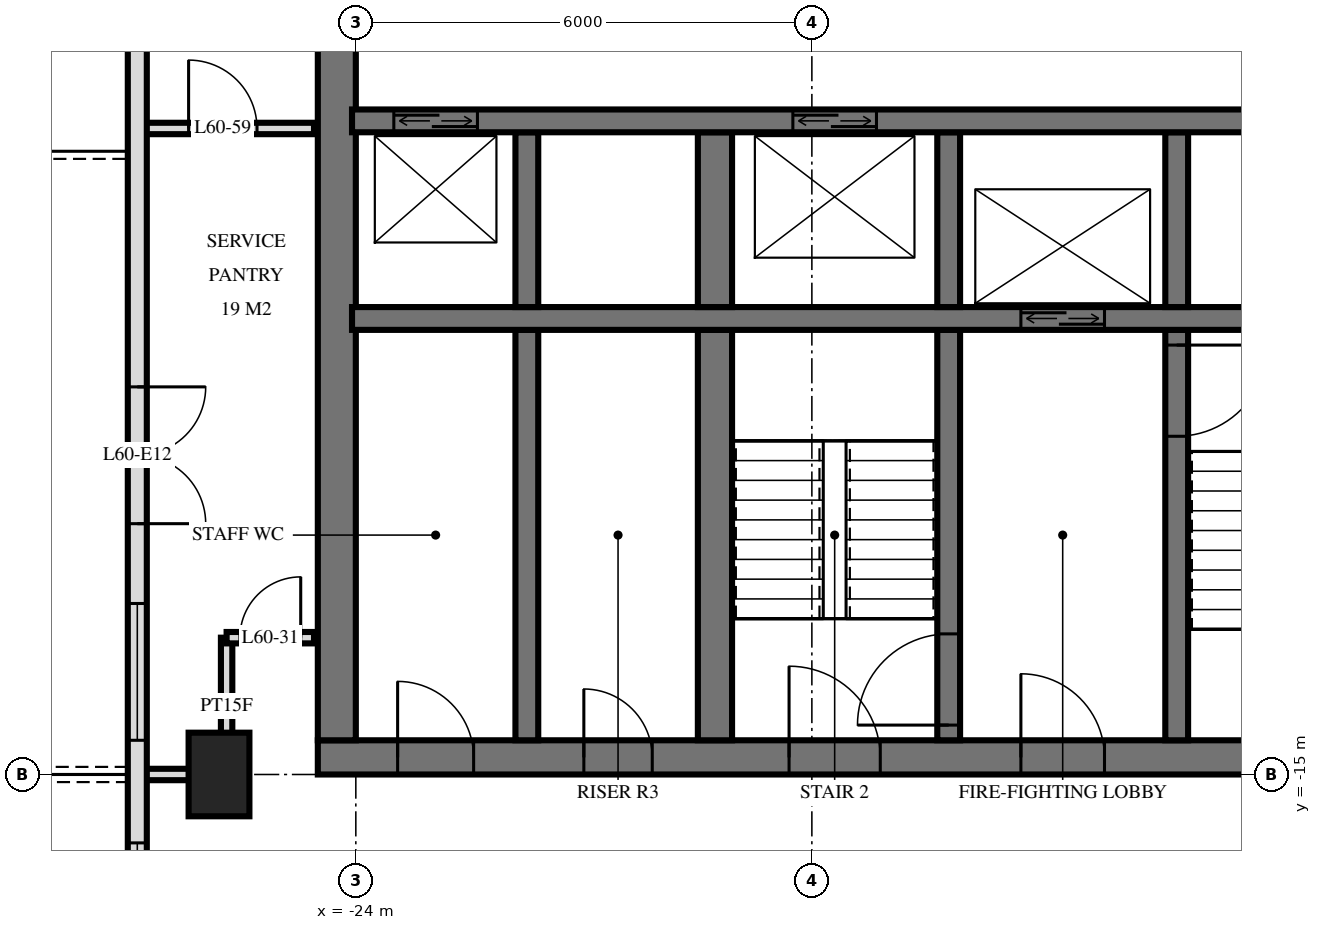
"""IFC4 building model, lengths in metres.
Left out: names, types, materials, properties, quantities, classifications, styles, units other than length and angle.
Written with IfcOpenShell. Run it as: python <this file> out.ifc"""

import sys

from ifc_helpers import new_model, si_unit, direction, frame, frame_2d, origin, origin_2d, place, context, subcontext, project, spatial, rectangle, extrude, element, fill, save


model = new_model("IFC4")
c1 = context("Model", 3, precision=1e-05, world=origin(), true_north=direction((0.0, 1.0)))
c2 = subcontext(c1, "Body", "Model", "MODEL_VIEW")
j1 = project(units=[si_unit("LENGTHUNIT", "METRE"), si_unit("PLANEANGLEUNIT", "RADIAN")], contexts=[c1])
p1 = place(None, origin())
s1 = spatial("IfcSite", under=j1, at=p1, CompositionType="ELEMENT")
p2 = place(p1, origin())
s2 = spatial("IfcBuilding", under=s1, at=p2, CompositionType="ELEMENT")
p3 = place(p2, frame((0.0, 0.0, 229.1)))
s3 = spatial("IfcBuildingStorey", under=s2, at=p3, CompositionType="ELEMENT", Elevation=229.1)
p4 = place(p3, frame((-25.8, -15.0, 0.0), z_axis=(0.0, 0.0, 1.0), x_axis=(0.0, 1.0, 0.0)))
e1 = element("IfcColumn", 1, at=p4, inside=s3, PredefinedType="COLUMN", context=c2, shape_type="SweptSolid", body=[
    extrude(rectangle(XDim=1.1, YDim=0.8, at=origin_2d()), origin(), (0.0, 0.0, 1.0), 3.5),
])
p5 = place(p3, frame((-24.5, -14.775, 0.0), z_axis=(0.0, 0.0, 1.0), x_axis=(1.0, 0.0, 0.0)))
e2 = element("IfcWall", 2, at=p5, inside=s3, PredefinedType="SHEAR", context=c2, shape_type="SweptSolid", body=[
    extrude(rectangle(XDim=14.5, YDim=0.45, at=frame_2d((7.25, 0.0))), origin(), (0.0, 0.0, 1.0), 3.5),
])
p6 = place(p5, frame((6.2, 0.0, 0.0)))
e3 = element("IfcOpeningElement", 3, at=p6, cuts=e2, PredefinedType="OPENING", context=c2, shape_type="SweptSolid", body=[
    extrude(rectangle(XDim=1.2, YDim=2.1, at=frame_2d((0.6, 1.05))), frame((0.0, 0.235, 0.0), z_axis=(0.0, -1.0, 0.0), x_axis=(1.0, 0.0, 0.0)), (0.0, 0.0, 1.0), 0.47),
])
p7 = place(p5, frame((9.25, 0.0, 0.0)))
e4 = element("IfcOpeningElement", 4, at=p7, cuts=e2, PredefinedType="OPENING", context=c2, shape_type="SweptSolid", body=[
    extrude(rectangle(XDim=1.1, YDim=2.1, at=frame_2d((0.55, 1.05))), frame((0.0, 0.235, 0.0), z_axis=(0.0, -1.0, 0.0), x_axis=(1.0, 0.0, 0.0)), (0.0, 0.0, 1.0), 0.47),
])
p8 = place(p5, frame((3.5, 0.0, 0.0)))
e5 = element("IfcOpeningElement", 5, at=p8, cuts=e2, PredefinedType="OPENING", context=c2, shape_type="SweptSolid", body=[
    extrude(rectangle(XDim=0.9, YDim=2.1, at=frame_2d((0.45, 1.05))), frame((0.0, 0.235, 0.0), z_axis=(0.0, -1.0, 0.0), x_axis=(1.0, 0.0, 0.0)), (0.0, 0.0, 1.0), 0.47),
])
p9 = place(p5, frame((1.05, 0.0, 0.0)))
e6 = element("IfcOpeningElement", 6, at=p9, cuts=e2, PredefinedType="OPENING", context=c2, shape_type="SweptSolid", body=[
    extrude(rectangle(XDim=1.0, YDim=2.1, at=frame_2d((0.5, 1.05))), frame((0.0, 0.235, 0.0), z_axis=(0.0, -1.0, 0.0), x_axis=(1.0, 0.0, 0.0)), (0.0, 0.0, 1.0), 0.47),
])
p10 = place(p3, frame((-24.25, -14.55, 0.0), z_axis=(0.0, 0.0, 1.0), x_axis=(0.0, 1.0, 0.0)))
e7 = element("IfcWall", 7, at=p10, inside=s3, PredefinedType="SHEAR", context=c2, shape_type="SweptSolid", body=[
    extrude(rectangle(XDim=14.1, YDim=0.5, at=frame_2d((7.05, 0.0))), origin(), (0.0, 0.0, 1.0), 3.5),
])
p11 = place(p3, frame((-24.05, -6.4, 0.0), z_axis=(0.0, 0.0, 1.0), x_axis=(1.0, 0.0, 0.0)))
e8 = element("IfcWall", 8, at=p11, inside=s3, PredefinedType="SHEAR", context=c2, shape_type="SweptSolid", body=[
    extrude(rectangle(XDim=13.7, YDim=0.3, at=frame_2d((6.85, 0.0))), origin(), (0.0, 0.0, 1.0), 3.5),
])
p12 = place(p11, frame((0.55, 0.0, 0.0)))
e9 = element("IfcOpeningElement", 9, at=p12, cuts=e8, PredefinedType="OPENING", context=c2, shape_type="SweptSolid", body=[
    extrude(rectangle(XDim=1.1, YDim=2.1, at=frame_2d((0.55, 1.05))), frame((0.0, 0.16, 0.0), z_axis=(0.0, -1.0, 0.0), x_axis=(1.0, 0.0, 0.0)), (0.0, 0.0, 1.0), 0.32),
])
p13 = place(p11, frame((5.8, 0.0, 0.0)))
e10 = element("IfcOpeningElement", 10, at=p13, cuts=e8, PredefinedType="OPENING", context=c2, shape_type="SweptSolid", body=[
    extrude(rectangle(XDim=1.1, YDim=2.1, at=frame_2d((0.55, 1.05))), frame((0.0, 0.16, 0.0), z_axis=(0.0, -1.0, 0.0), x_axis=(1.0, 0.0, 0.0)), (0.0, 0.0, 1.0), 0.32),
])
p14 = place(p3, frame((-24.05, -9.0, 0.0), z_axis=(0.0, 0.0, 1.0), x_axis=(1.0, 0.0, 0.0)))
e11 = element("IfcWall", 11, at=p14, inside=s3, PredefinedType="SHEAR", context=c2, shape_type="SweptSolid", body=[
    extrude(rectangle(XDim=13.7, YDim=0.3, at=frame_2d((6.85, 0.0))), origin(), (0.0, 0.0, 1.0), 3.5),
])
p15 = place(p14, frame((8.8, 0.0, 0.0)))
e12 = element("IfcOpeningElement", 12, at=p15, cuts=e11, PredefinedType="OPENING", context=c2, shape_type="SweptSolid", body=[
    extrude(rectangle(XDim=1.1, YDim=2.1, at=frame_2d((0.55, 1.05))), frame((0.0, 0.16, 0.0), z_axis=(0.0, -1.0, 0.0), x_axis=(1.0, 0.0, 0.0)), (0.0, 0.0, 1.0), 0.32),
])
p16 = place(p3, frame((-13.2, -8.85, 0.0), z_axis=(0.0, 0.0, 1.0), x_axis=(0.0, 1.0, 0.0)))
e13 = element("IfcWall", 13, at=p16, inside=s3, PredefinedType="SHEAR", context=c2, shape_type="SweptSolid", body=[
    extrude(rectangle(XDim=2.3, YDim=0.3, at=frame_2d((1.15, 0.0))), origin(), (0.0, 0.0, 1.0), 3.5),
])
p17 = place(p3, frame((-13.2, -14.55, 0.0), z_axis=(0.0, 0.0, 1.0), x_axis=(0.0, 1.0, 0.0)))
e14 = element("IfcWall", 14, at=p17, inside=s3, PredefinedType="SHEAR", context=c2, shape_type="SweptSolid", body=[
    extrude(rectangle(XDim=5.4, YDim=0.3, at=frame_2d((2.7, 0.0))), origin(), (0.0, 0.0, 1.0), 3.5),
])
p18 = place(p17, frame((4.0, 0.0, 0.0)))
e15 = element("IfcOpeningElement", 15, at=p18, cuts=e14, PredefinedType="OPENING", context=c2, shape_type="SweptSolid", body=[
    extrude(rectangle(XDim=1.2, YDim=2.1, at=frame_2d((0.6, 1.05))), frame((0.0, 0.16, 0.0), z_axis=(0.0, -1.0, 0.0), x_axis=(1.0, 0.0, 0.0)), (0.0, 0.0, 1.0), 0.32),
])
p19 = place(p3, frame((-16.2, -8.85, 0.0), z_axis=(0.0, 0.0, 1.0), x_axis=(0.0, 1.0, 0.0)))
e16 = element("IfcWall", 16, at=p19, inside=s3, PredefinedType="SHEAR", context=c2, shape_type="SweptSolid", body=[
    extrude(rectangle(XDim=2.3, YDim=0.3, at=frame_2d((1.15, 0.0))), origin(), (0.0, 0.0, 1.0), 3.5),
])
p20 = place(p3, frame((-16.2, -14.55, 0.0), z_axis=(0.0, 0.0, 1.0), x_axis=(0.0, 1.0, 0.0)))
e17 = element("IfcWall", 17, at=p20, inside=s3, PredefinedType="SHEAR", context=c2, shape_type="SweptSolid", body=[
    extrude(rectangle(XDim=5.4, YDim=0.3, at=frame_2d((2.7, 0.0))), origin(), (0.0, 0.0, 1.0), 3.5),
])
p21 = place(p20, frame((0.2, 0.0, 0.0)))
e18 = element("IfcOpeningElement", 18, at=p21, cuts=e17, PredefinedType="OPENING", context=c2, shape_type="SweptSolid", body=[
    extrude(rectangle(XDim=1.2, YDim=2.1, at=frame_2d((0.6, 1.05))), frame((0.0, 0.16, 0.0), z_axis=(0.0, -1.0, 0.0), x_axis=(1.0, 0.0, 0.0)), (0.0, 0.0, 1.0), 0.32),
])
p22 = place(p3, frame((-19.275, -8.85, 0.0), z_axis=(0.0, 0.0, 1.0), x_axis=(0.0, 1.0, 0.0)))
e19 = element("IfcWall", 19, at=p22, inside=s3, PredefinedType="SHEAR", context=c2, shape_type="SweptSolid", body=[
    extrude(rectangle(XDim=2.3, YDim=0.45, at=frame_2d((1.15, 0.0))), origin(), (0.0, 0.0, 1.0), 3.5),
])
p23 = place(p3, frame((-19.275, -14.55, 0.0), z_axis=(0.0, 0.0, 1.0), x_axis=(0.0, 1.0, 0.0)))
e20 = element("IfcWall", 20, at=p23, inside=s3, PredefinedType="SHEAR", context=c2, shape_type="SweptSolid", body=[
    extrude(rectangle(XDim=5.4, YDim=0.45, at=frame_2d((2.7, 0.0))), origin(), (0.0, 0.0, 1.0), 3.5),
])
p24 = place(p3, frame((-21.75, -8.85, 0.0), z_axis=(0.0, 0.0, 1.0), x_axis=(0.0, 1.0, 0.0)))
e21 = element("IfcWall", 21, at=p24, inside=s3, PredefinedType="SHEAR", context=c2, shape_type="SweptSolid", body=[
    extrude(rectangle(XDim=2.3, YDim=0.3, at=frame_2d((1.15, 0.0))), origin(), (0.0, 0.0, 1.0), 3.5),
])
p25 = place(p3, frame((-21.75, -14.55, 0.0), z_axis=(0.0, 0.0, 1.0), x_axis=(0.0, 1.0, 0.0)))
e22 = element("IfcWall", 22, at=p25, inside=s3, PredefinedType="SHEAR", context=c2, shape_type="SweptSolid", body=[
    extrude(rectangle(XDim=5.4, YDim=0.3, at=frame_2d((2.7, 0.0))), origin(), (0.0, 0.0, 1.0), 3.5),
])
p26 = place(p3, frame((-26.875, -3.325, 0.0), z_axis=(0.0, 0.0, 1.0), x_axis=(0.0, -1.0, 0.0)))
e23 = element("IfcWall", 23, at=p26, inside=s3, PredefinedType="SOLIDWALL", context=c2, shape_type="SweptSolid", body=[
    extrude(rectangle(XDim=21.551, YDim=0.25, at=frame_2d((10.775, 0.0))), origin(), (0.0, 0.0, 1.0), 3.22),
])
p27 = place(p26, frame((6.575, 0.0, 0.0)))
e24 = element("IfcOpeningElement", 24, at=p27, cuts=e23, PredefinedType="OPENING", context=c2, shape_type="SweptSolid", body=[
    extrude(rectangle(XDim=1.8, YDim=2.4, at=frame_2d((0.9, 1.2))), frame((0.0, 0.135, 0.0), z_axis=(0.0, -1.0, 0.0), x_axis=(1.0, 0.0, 0.0)), (0.0, 0.0, 1.0), 0.27),
])
p28 = place(p26, frame((9.425, 0.0, 0.9)))
e25 = element("IfcOpeningElement", 25, at=p28, cuts=e23, PredefinedType="OPENING", context=c2, shape_type="SweptSolid", body=[
    extrude(rectangle(XDim=1.8, YDim=1.5, at=frame_2d((0.9, 0.75))), frame((0.0, 0.135, 0.0), z_axis=(0.0, -1.0, 0.0), x_axis=(1.0, 0.0, 0.0)), (0.0, 0.0, 1.0), 0.27),
])
p29 = place(p26, frame((12.575, 0.0, 0.9)))
e26 = element("IfcOpeningElement", 26, at=p29, cuts=e23, PredefinedType="OPENING", context=c2, shape_type="SweptSolid", body=[
    extrude(rectangle(XDim=1.2, YDim=1.5, at=frame_2d((0.6, 0.75))), frame((0.0, 0.135, 0.0), z_axis=(0.0, -1.0, 0.0), x_axis=(1.0, 0.0, 0.0)), (0.0, 0.0, 1.0), 0.27),
])
p30 = place(p26, frame((15.275, 0.0, 0.0)))
e27 = element("IfcOpeningElement", 27, at=p30, cuts=e23, PredefinedType="OPENING", context=c2, shape_type="SweptSolid", body=[
    extrude(rectangle(XDim=1.8, YDim=2.4, at=frame_2d((0.9, 1.2))), frame((0.0, 0.135, 0.0), z_axis=(0.0, -1.0, 0.0), x_axis=(1.0, 0.0, 0.0)), (0.0, 0.0, 1.0), 0.27),
])
p31 = place(p26, frame((18.875, 0.0, 0.0)))
e28 = element("IfcOpeningElement", 28, at=p31, cuts=e23, PredefinedType="OPENING", context=c2, shape_type="SweptSolid", body=[
    extrude(rectangle(XDim=1.8, YDim=2.4, at=frame_2d((0.9, 1.2))), frame((0.0, 0.135, 0.0), z_axis=(0.0, -1.0, 0.0), x_axis=(1.0, 0.0, 0.0)), (0.0, 0.0, 1.0), 0.27),
])
p32 = place(p3, frame((-25.7, -15.0, 0.0), z_axis=(0.0, 0.0, 1.0), x_axis=(0.0, 1.0, 0.0)))
e29 = element("IfcWall", 29, at=p32, inside=s3, PredefinedType="PARTITIONING", context=c2, shape_type="SweptSolid", body=[
    extrude(rectangle(XDim=1.8, YDim=0.15, at=frame_2d((0.9, 0.0))), origin(), (0.0, 0.0, 1.0), 3.22),
])
p33 = place(p3, frame((-26.82, -15.0, 0.0), z_axis=(0.0, 0.0, 1.0), x_axis=(1.0, 0.0, 0.0)))
e30 = element("IfcWall", 30, at=p33, inside=s3, PredefinedType="PARTITIONING", context=c2, shape_type="SweptSolid", body=[
    extrude(rectangle(XDim=1.12, YDim=0.15, at=frame_2d((0.56, 0.0))), origin(), (0.0, 0.0, 1.0), 3.22),
])
p34 = place(p3, frame((-25.7, -13.2, 0.0), z_axis=(0.0, 0.0, 1.0), x_axis=(1.0, 0.0, 0.0)))
e31 = element("IfcWall", 31, at=p34, inside=s3, PredefinedType="PARTITIONING", context=c2, shape_type="SweptSolid", body=[
    extrude(rectangle(XDim=1.15, YDim=0.15, at=frame_2d((0.575, 0.0))), origin(), (0.0, 0.0, 1.0), 3.22),
])
p35 = place(p34, frame((0.175, 0.0, 0.0)))
e32 = element("IfcOpeningElement", 32, at=p35, cuts=e31, PredefinedType="OPENING", context=c2, shape_type="SweptSolid", body=[
    extrude(rectangle(XDim=0.8, YDim=2.1, at=frame_2d((0.4, 1.05))), frame((0.0, 0.085, 0.0), z_axis=(0.0, -1.0, 0.0), x_axis=(1.0, 0.0, 0.0)), (0.0, 0.0, 1.0), 0.17),
])
p36 = place(p3, frame((-26.82, -6.5, 0.0), z_axis=(0.0, 0.0, 1.0), x_axis=(1.0, 0.0, 0.0)))
e33 = element("IfcWall", 33, at=p36, inside=s3, PredefinedType="PARTITIONING", context=c2, shape_type="SweptSolid", body=[
    extrude(rectangle(XDim=2.27, YDim=0.15, at=frame_2d((1.135, 0.0))), origin(), (0.0, 0.0, 1.0), 3.22),
])
p37 = place(p36, frame((0.62, 0.0, 0.0)))
e34 = element("IfcOpeningElement", 34, at=p37, cuts=e33, PredefinedType="OPENING", context=c2, shape_type="SweptSolid", body=[
    extrude(rectangle(XDim=0.9, YDim=2.1, at=frame_2d((0.45, 1.05))), frame((0.0, 0.085, 0.0), z_axis=(0.0, -1.0, 0.0), x_axis=(1.0, 0.0, 0.0)), (0.0, 0.0, 1.0), 0.17),
])
p38 = place(p27, origin())
e35 = element("IfcDoor", 35, at=p38, inside=s3, OperationType="DOUBLE_DOOR_SINGLE_SWING", PredefinedType="DOOR", context=c2, shape_type="SweptSolid", body=[
    extrude(rectangle(XDim=1.8, YDim=2.4, at=frame_2d((0.9, 1.2))), frame((0.0, 0.025, 0.0), z_axis=(0.0, -1.0, 0.0), x_axis=(1.0, 0.0, 0.0)), (0.0, 0.0, 1.0), 0.05),
])
fill(e24, e35)
p39 = place(p28, origin())
e36 = element("IfcWindow", 36, at=p39, inside=s3, PartitioningType="SINGLE_PANEL", PredefinedType="WINDOW", context=c2, shape_type="SweptSolid", body=[
    extrude(rectangle(XDim=1.8, YDim=1.5, at=frame_2d((0.9, 0.75))), frame((0.0, 0.03, 0.0), z_axis=(0.0, -1.0, 0.0), x_axis=(1.0, 0.0, 0.0)), (0.0, 0.0, 1.0), 0.06),
])
fill(e25, e36)
p40 = place(p29, origin())
e37 = element("IfcWindow", 37, at=p40, inside=s3, PartitioningType="SINGLE_PANEL", PredefinedType="WINDOW", context=c2, shape_type="SweptSolid", body=[
    extrude(rectangle(XDim=1.2, YDim=1.5, at=frame_2d((0.6, 0.75))), frame((0.0, 0.03, 0.0), z_axis=(0.0, -1.0, 0.0), x_axis=(1.0, 0.0, 0.0)), (0.0, 0.0, 1.0), 0.06),
])
fill(e26, e37)
p41 = place(p12, origin())
e38 = element("IfcDoor", 38, at=p41, inside=s3, OperationType="DOUBLE_DOOR_SLIDING", PredefinedType="USERDEFINED", context=c2, shape_type="SweptSolid", body=[
    extrude(rectangle(XDim=1.1, YDim=2.1, at=frame_2d((0.55, 1.05))), frame((0.0, 0.025, 0.0), z_axis=(0.0, -1.0, 0.0), x_axis=(1.0, 0.0, 0.0)), (0.0, 0.0, 1.0), 0.05),
])
fill(e9, e38)
p42 = place(p15, origin())
e39 = element("IfcDoor", 39, at=p42, inside=s3, OperationType="DOUBLE_DOOR_SLIDING", PredefinedType="USERDEFINED", context=c2, shape_type="SweptSolid", body=[
    extrude(rectangle(XDim=1.1, YDim=2.1, at=frame_2d((0.55, 1.05))), frame((0.0, 0.025, 0.0), z_axis=(0.0, -1.0, 0.0), x_axis=(1.0, 0.0, 0.0)), (0.0, 0.0, 1.0), 0.05),
])
fill(e12, e39)
p43 = place(p13, origin())
e40 = element("IfcDoor", 40, at=p43, inside=s3, OperationType="DOUBLE_DOOR_SLIDING", PredefinedType="USERDEFINED", context=c2, shape_type="SweptSolid", body=[
    extrude(rectangle(XDim=1.1, YDim=2.1, at=frame_2d((0.55, 1.05))), frame((0.0, 0.025, 0.0), z_axis=(0.0, -1.0, 0.0), x_axis=(1.0, 0.0, 0.0)), (0.0, 0.0, 1.0), 0.05),
])
fill(e10, e40)
p44 = place(p6, origin())
e41 = element("IfcDoor", 41, at=p44, inside=s3, OperationType="SINGLE_SWING_RIGHT", PredefinedType="DOOR", context=c2, shape_type="SweptSolid", body=[
    extrude(rectangle(XDim=1.2, YDim=2.1, at=frame_2d((0.6, 1.05))), frame((0.0, 0.025, 0.0), z_axis=(0.0, -1.0, 0.0), x_axis=(1.0, 0.0, 0.0)), (0.0, 0.0, 1.0), 0.05),
])
fill(e3, e41)
p45 = place(p7, origin())
e42 = element("IfcDoor", 42, at=p45, inside=s3, OperationType="SINGLE_SWING_RIGHT", PredefinedType="DOOR", context=c2, shape_type="SweptSolid", body=[
    extrude(rectangle(XDim=1.1, YDim=2.1, at=frame_2d((0.55, 1.05))), frame((0.0, 0.025, 0.0), z_axis=(0.0, -1.0, 0.0), x_axis=(1.0, 0.0, 0.0)), (0.0, 0.0, 1.0), 0.05),
])
fill(e4, e42)
p46 = place(p8, origin())
e43 = element("IfcDoor", 43, at=p46, inside=s3, OperationType="SINGLE_SWING_RIGHT", PredefinedType="DOOR", context=c2, shape_type="SweptSolid", body=[
    extrude(rectangle(XDim=0.9, YDim=2.1, at=frame_2d((0.45, 1.05))), frame((0.0, 0.025, 0.0), z_axis=(0.0, -1.0, 0.0), x_axis=(1.0, 0.0, 0.0)), (0.0, 0.0, 1.0), 0.05),
])
fill(e5, e43)
p47 = place(p9, origin())
e44 = element("IfcDoor", 44, at=p47, inside=s3, OperationType="SINGLE_SWING_RIGHT", PredefinedType="DOOR", context=c2, shape_type="SweptSolid", body=[
    extrude(rectangle(XDim=1.0, YDim=2.1, at=frame_2d((0.5, 1.05))), frame((0.0, 0.025, 0.0), z_axis=(0.0, -1.0, 0.0), x_axis=(1.0, 0.0, 0.0)), (0.0, 0.0, 1.0), 0.05),
])
fill(e6, e44)
p48 = place(p18, frame((0.6, 0.0, 0.0), z_axis=(0.0, 0.0, 1.0), x_axis=(-1.0, 0.0, 0.0)))
e45 = element("IfcDoor", 45, at=p48, inside=s3, OperationType="SINGLE_SWING_RIGHT", PredefinedType="DOOR", context=c2, shape_type="SweptSolid", body=[
    extrude(rectangle(XDim=1.2, YDim=2.1, at=frame_2d((0.0, 1.05))), frame((0.0, -0.025, 0.0), z_axis=(0.0, 1.0, 0.0), x_axis=(-1.0, 0.0, 0.0)), (0.0, 0.0, 1.0), 0.05),
])
fill(e15, e45)
p49 = place(p21, origin())
e46 = element("IfcDoor", 46, at=p49, inside=s3, OperationType="SINGLE_SWING_RIGHT", PredefinedType="DOOR", context=c2, shape_type="SweptSolid", body=[
    extrude(rectangle(XDim=1.2, YDim=2.1, at=frame_2d((0.6, 1.05))), frame((0.0, 0.025, 0.0), z_axis=(0.0, -1.0, 0.0), x_axis=(1.0, 0.0, 0.0)), (0.0, 0.0, 1.0), 0.05),
])
fill(e18, e46)
p50 = place(p35, origin())
e47 = element("IfcDoor", 47, at=p50, inside=s3, OperationType="SINGLE_SWING_LEFT", PredefinedType="DOOR", context=c2, shape_type="SweptSolid", body=[
    extrude(rectangle(XDim=0.8, YDim=2.1, at=frame_2d((0.4, 1.05))), frame((0.0, 0.025, 0.0), z_axis=(0.0, -1.0, 0.0), x_axis=(1.0, 0.0, 0.0)), (0.0, 0.0, 1.0), 0.05),
])
fill(e32, e47)
p51 = place(p37, origin())
e48 = element("IfcDoor", 48, at=p51, inside=s3, OperationType="SINGLE_SWING_RIGHT", PredefinedType="DOOR", context=c2, shape_type="SweptSolid", body=[
    extrude(rectangle(XDim=0.9, YDim=2.1, at=frame_2d((0.45, 1.05))), frame((0.0, 0.025, 0.0), z_axis=(0.0, -1.0, 0.0), x_axis=(1.0, 0.0, 0.0)), (0.0, 0.0, 1.0), 0.05),
])
fill(e34, e48)
save(model, sys.argv[1])
